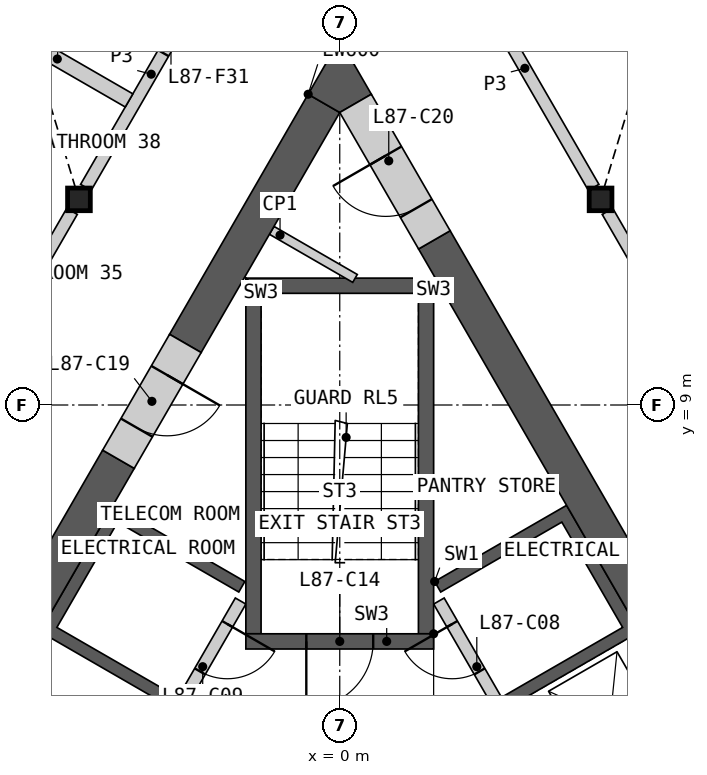
"""IFC4 building model, lengths in metres.
Left out: names, types, materials, properties, quantities, classifications, styles, units other than length and angle.
Written with IfcOpenShell. Run it as: python <this file> out.ifc"""

import sys

from ifc_helpers import new_model, si_unit, direction, frame, frame_2d, origin, origin_2d, place, context, subcontext, project, spatial, polyline, rectangle, i_section, outline, extrude, element, fill, save


model = new_model("IFC4")
c1 = context("Model", 3, precision=1e-05, world=origin(), true_north=direction((0.0, 1.0)))
c2 = subcontext(c1, "Body", "Model", "MODEL_VIEW")
j1 = project(units=[si_unit("LENGTHUNIT", "METRE"), si_unit("PLANEANGLEUNIT", "RADIAN")], contexts=[c1])
p1 = place(None, origin())
s1 = spatial("IfcSite", under=j1, at=p1, CompositionType="ELEMENT")
p2 = place(p1, origin())
s2 = spatial("IfcBuilding", under=s1, at=p2, CompositionType="ELEMENT")
p3 = place(p2, frame((0.0, 0.0, 384.8)))
s3 = spatial("IfcBuildingStorey", under=s2, at=p3, CompositionType="ELEMENT", Elevation=384.8)
for number, where, z_axis, x_axis in (
    (1, (-4.289, 12.382, 0.0), (0.0, 0.0, 1.0), (1.0, 0.0, 0.0)),
    (2, (4.289, 12.382, 0.0), (0.0, 0.0, 1.0), (1.0, 0.0, 0.0)),
):
    element("IfcColumn", number, at=place(p3, frame(where, z_axis=z_axis, x_axis=x_axis)), inside=s3, PredefinedType="COLUMN", context=c2, shape_type="SweptSolid", body=[
        extrude(i_section(OverallWidth=0.374, OverallDepth=0.372, WebThickness=0.016, FlangeThickness=0.026, at=origin_2d()), origin(), (0.0, 0.0, 1.0), 3.4),
    ])
p4 = place(p3, origin())
e3 = element("IfcWall", 3, at=p4, inside=s3, PredefinedType="SHEAR", context=c2, shape_type="SweptSolid", body=[
    extrude(outline(polyline([(1.561, 6.097), (3.731, 7.35), (8.231, -0.444), (6.061, -1.697), (5.96, -1.524), (7.952, -0.374), (6.952, 1.358), (4.96, 0.208), (4.861, 0.381), (6.852, 1.531), (5.852, 3.263), (3.861, 2.113), (3.76, 2.287), (5.752, 3.437), (4.752, 5.169), (2.76, 4.019), (2.66, 4.192), (4.652, 5.342), (3.652, 7.074), (1.66, 5.924), (1.561, 6.097)])), origin(), (0.0, 0.0, 1.0), 3.1),
])
p5 = place(p3, frame((5.817, -1.476, 0.0), z_axis=(0.0, 0.0, 1.0), x_axis=(-0.500002616675, 0.866023893041, 0.0)))
e4 = element("IfcWall", 4, at=p5, inside=s3, PredefinedType="SOLIDWALL", context=c2, shape_type="SweptSolid", body=[
    extrude(rectangle(XDim=8.373, YDim=0.2, at=frame_2d((4.187, 0.0))), origin(), (0.0, 0.0, 1.0), 3.1),
])
p6 = place(p5, frame((0.337, 0.0, 0.0)))
e5 = element("IfcOpeningElement", 5, at=p6, cuts=e4, PredefinedType="OPENING", context=c2, shape_type="SweptSolid", body=[
    extrude(rectangle(XDim=1.1, YDim=2.1, at=frame_2d((0.55, 1.05))), frame((0.0, 0.11, 0.0), z_axis=(0.0, -1.0, 0.0), x_axis=(1.0, 0.0, 0.0)), (0.0, 0.0, 1.0), 0.22),
])
p7 = place(p5, frame((2.537, 0.0, 0.0)))
e6 = element("IfcOpeningElement", 6, at=p7, cuts=e4, PredefinedType="OPENING", context=c2, shape_type="SweptSolid", body=[
    extrude(rectangle(XDim=1.1, YDim=2.1, at=frame_2d((0.55, 1.05))), frame((0.0, 0.11, 0.0), z_axis=(0.0, -1.0, 0.0), x_axis=(1.0, 0.0, 0.0)), (0.0, 0.0, 1.0), 0.22),
])
p8 = place(p5, frame((4.737, 0.0, 0.0)))
e7 = element("IfcOpeningElement", 7, at=p8, cuts=e4, PredefinedType="OPENING", context=c2, shape_type="SweptSolid", body=[
    extrude(rectangle(XDim=1.1, YDim=2.1, at=frame_2d((0.55, 1.05))), frame((0.0, 0.11, 0.0), z_axis=(0.0, -1.0, 0.0), x_axis=(1.0, 0.0, 0.0)), (0.0, 0.0, 1.0), 0.22),
])
p9 = place(p5, frame((7.037, 0.0, 0.0)))
e8 = element("IfcOpeningElement", 8, at=p9, cuts=e4, PredefinedType="OPENING", context=c2, shape_type="SweptSolid", body=[
    extrude(rectangle(XDim=0.9, YDim=2.1, at=frame_2d((0.45, 1.05))), frame((0.0, 0.11, 0.0), z_axis=(0.0, -1.0, 0.0), x_axis=(1.0, 0.0, 0.0)), (0.0, 0.0, 1.0), 0.22),
])
p10 = place(p3, origin())
e9 = element("IfcWall", 9, at=p10, inside=s3, PredefinedType="SHEAR", context=c2, shape_type="SweptSolid", body=[
    extrude(outline(polyline([(-4.96, 0.208), (-7.131, 1.461), (-3.731, 7.35), (-1.561, 6.097), (-1.66, 5.924), (-3.652, 7.074), (-4.652, 5.342), (-2.66, 4.192), (-2.76, 4.019), (-4.752, 5.169), (-6.852, 1.531), (-4.861, 0.381), (-4.96, 0.208)])), origin(), (0.0, 0.0, 1.0), 3.1),
])
p11 = place(p3, frame((-1.631, 5.776, 0.0), z_axis=(0.0, 0.0, 1.0), x_axis=(-0.499992876559, -0.866029516466, 0.0)))
e10 = element("IfcWall", 10, at=p11, inside=s3, PredefinedType="SOLIDWALL", context=c2, shape_type="SweptSolid", body=[
    extrude(rectangle(XDim=6.486, YDim=0.2, at=frame_2d((3.243, 0.0))), origin(), (0.0, 0.0, 1.0), 3.1),
])
p12 = place(p11, frame((0.437, 0.0, 0.0)))
e11 = element("IfcOpeningElement", 11, at=p12, cuts=e10, PredefinedType="OPENING", context=c2, shape_type="SweptSolid", body=[
    extrude(rectangle(XDim=0.9, YDim=2.1, at=frame_2d((0.45, 1.05))), frame((0.0, 0.11, 0.0), z_axis=(0.0, -1.0, 0.0), x_axis=(1.0, 0.0, 0.0)), (0.0, 0.0, 1.0), 0.22),
])
p13 = place(p11, frame((3.737, 0.0, 0.0)))
e12 = element("IfcOpeningElement", 12, at=p13, cuts=e10, PredefinedType="OPENING", context=c2, shape_type="SweptSolid", body=[
    extrude(rectangle(XDim=0.9, YDim=2.1, at=frame_2d((0.45, 1.05))), frame((0.0, 0.11, 0.0), z_axis=(0.0, -1.0, 0.0), x_axis=(1.0, 0.0, 0.0)), (0.0, 0.0, 1.0), 0.22),
])
p14 = place(p3, origin())
e13 = element("IfcWall", 13, at=p14, inside=s3, PredefinedType="SHEAR", context=c2, shape_type="SweptSolid", body=[
    extrude(outline(polyline([(1.544, 5.237), (1.544, 11.087), (1.294, 10.837), (1.294, 5.237), (1.544, 5.237)])), origin(), (0.0, 0.0, 1.0), 3.1),
])
p15 = place(p3, origin())
e14 = element("IfcWall", 14, at=p15, inside=s3, PredefinedType="SHEAR", context=c2, shape_type="SweptSolid", body=[
    extrude(outline(polyline([(1.544, 11.087), (-1.544, 11.087), (-1.294, 10.837), (1.294, 10.837), (1.544, 11.087)])), origin(), (0.0, 0.0, 1.0), 3.1),
])
p16 = place(p3, origin())
e15 = element("IfcWall", 15, at=p16, inside=s3, PredefinedType="SHEAR", context=c2, shape_type="SweptSolid", body=[
    extrude(outline(polyline([(-1.294, 10.837), (-1.544, 11.087), (-1.544, 5.237), (-1.294, 5.237), (-1.294, 10.837)])), origin(), (0.0, 0.0, 1.0), 3.1),
])
p17 = place(p3, frame((1.544, 5.112, 0.0), z_axis=(0.0, 0.0, 1.0), x_axis=(-1.0, 0.0, 0.0)))
e16 = element("IfcWall", 16, at=p17, inside=s3, PredefinedType="SHEAR", context=c2, shape_type="SweptSolid", body=[
    extrude(rectangle(XDim=3.088, YDim=0.25, at=frame_2d((1.544, 0.0))), origin(), (0.0, 0.0, 1.0), 3.1),
])
p18 = place(p17, frame((0.994, 0.0, 0.0)))
e17 = element("IfcOpeningElement", 17, at=p18, cuts=e16, PredefinedType="OPENING", context=c2, shape_type="SweptSolid", body=[
    extrude(rectangle(XDim=1.1, YDim=2.1, at=frame_2d((0.55, 1.05))), frame((0.0, 0.135, 0.0), z_axis=(0.0, -1.0, 0.0), x_axis=(1.0, 0.0, 0.0)), (0.0, 0.0, 1.0), 0.27),
])
p19 = place(p3, frame((-1.119, 11.873, 0.0), z_axis=(0.0, 0.0, 1.0), x_axis=(0.865992812752, -0.500056445075, 0.0)))
e18 = element("IfcWall", 18, at=p19, inside=s3, PredefinedType="PARTITIONING", context=c2, shape_type="SweptSolid", body=[
    extrude(rectangle(XDim=1.582, YDim=0.15, at=frame_2d((0.791, 0.0))), origin(), (0.0, 0.0, 1.0), 3.1),
])
p20 = place(p3, frame((8.841, -0.902, 0.0), z_axis=(0.0, 0.0, 1.0), x_axis=(-0.499995618375, 0.866027933502, 0.0)))
e19 = element("IfcWall", 19, at=p20, inside=s3, PredefinedType="SHEAR", context=c2, shape_type="SweptSolid", body=[
    extrude(rectangle(XDim=14.571, YDim=0.6, at=frame_2d((7.285, 0.0))), origin(), (0.0, 0.0, 1.0), 3.1),
])
p21 = place(p3, frame((-3.639, 8.107, 0.0), z_axis=(0.0, 0.0, 1.0), x_axis=(-0.49999180351, -0.866030135978, 0.0)))
e20 = element("IfcWall", 20, at=p21, inside=s3, PredefinedType="SHEAR", context=c2, shape_type="SweptSolid", body=[
    extrude(rectangle(XDim=7.401, YDim=0.6, at=frame_2d((3.701, 0.0))), origin(), (0.0, 0.0, 1.0), 3.1),
])
p22 = place(p3, frame((-0.26, 13.961, 0.0), z_axis=(0.0, 0.0, 1.0), x_axis=(-0.499980485389, -0.866036670257, 0.0)))
e21 = element("IfcWall", 21, at=p22, inside=s3, PredefinedType="SHEAR", context=c2, shape_type="SweptSolid", body=[
    extrude(rectangle(XDim=4.559, YDim=0.6, at=frame_2d((2.28, 0.0))), origin(), (0.0, 0.0, 1.0), 3.1),
])
p23 = place(p3, origin())
e22 = element("IfcWall", 22, at=p23, inside=s3, PredefinedType="SHEAR", context=c2, shape_type="SweptSolid", body=[
    extrude(outline(polyline([(-0.52, 14.111), (0.0, 15.011), (0.52, 14.111), (0.0, 13.811), (-0.52, 14.111)])), origin(), (0.0, 0.0, 1.0), 3.1),
])
p24 = place(p3, frame((-2.539, 10.013, 0.0), z_axis=(0.0, 0.0, 1.0), x_axis=(-0.50002983664, -0.866008176907, 0.0)))
e23 = element("IfcWall", 23, at=p24, inside=s3, PredefinedType="SHEAR", context=c2, shape_type="SweptSolid", body=[
    extrude(rectangle(XDim=2.2, YDim=0.6, at=frame_2d((1.1, 0.0))), origin(), (0.0, 0.0, 1.0), 3.1),
])
p25 = place(p24, frame((0.6, 0.0, 0.0)))
e24 = element("IfcOpeningElement", 24, at=p25, cuts=e23, PredefinedType="OPENING", context=c2, shape_type="SweptSolid", body=[
    extrude(rectangle(XDim=1.0, YDim=2.1, at=frame_2d((0.5, 1.05))), frame((0.0, 0.31, 0.0), z_axis=(0.0, -1.0, 0.0), x_axis=(1.0, 0.0, 0.0)), (0.0, 0.0, 1.0), 0.62),
])
p26 = place(p3, frame((1.556, 11.716, 0.0), z_axis=(0.0, 0.0, 1.0), x_axis=(-0.500018667571, 0.866014625789, 0.0)))
e25 = element("IfcWall", 25, at=p26, inside=s3, PredefinedType="SHEAR", context=c2, shape_type="SweptSolid", body=[
    extrude(rectangle(XDim=2.592, YDim=0.6, at=frame_2d((1.296, 0.0))), origin(), (0.0, 0.0, 1.0), 3.1),
])
p27 = place(p26, frame((0.6, 0.0, 0.0)))
e26 = element("IfcOpeningElement", 26, at=p27, cuts=e25, PredefinedType="OPENING", context=c2, shape_type="SweptSolid", body=[
    extrude(rectangle(XDim=1.0, YDim=2.1, at=frame_2d((0.5, 1.05))), frame((0.0, 0.31, 0.0), z_axis=(0.0, -1.0, 0.0), x_axis=(1.0, 0.0, 0.0)), (0.0, 0.0, 1.0), 0.62),
])
p28 = place(p3, frame((4.403, 12.185, 0.0), z_axis=(0.0, 0.0, 1.0), x_axis=(0.499992155518, -0.866029932751, 0.0)))
e27 = element("IfcWall", 27, at=p28, inside=s3, PredefinedType="PARTITIONING", context=c2, shape_type="SweptSolid", body=[
    extrude(rectangle(XDim=8.123, YDim=0.2, at=frame_2d((4.062, 0.0))), origin(), (0.0, 0.0, 1.0), 3.1),
])
p29 = place(p28, frame((3.587, 0.0, 0.0)))
e28 = element("IfcOpeningElement", 28, at=p29, cuts=e27, PredefinedType="OPENING", context=c2, shape_type="SweptSolid", body=[
    extrude(rectangle(XDim=0.95, YDim=2.1, at=frame_2d((0.475, 1.05))), frame((0.0, 0.11, 0.0), z_axis=(0.0, -1.0, 0.0), x_axis=(1.0, 0.0, 0.0)), (0.0, 0.0, 1.0), 0.22),
])
p30 = place(p3, frame((-8.465, 5.15, 0.0), z_axis=(0.0, 0.0, 1.0), x_axis=(0.499992155518, 0.866029932751, 0.0)))
e29 = element("IfcWall", 29, at=p30, inside=s3, PredefinedType="PARTITIONING", context=c2, shape_type="SweptSolid", body=[
    extrude(rectangle(XDim=8.123, YDim=0.2, at=frame_2d((4.062, 0.0))), origin(), (0.0, 0.0, 1.0), 3.1),
])
p31 = place(p30, frame((1.153, 0.0, 0.0)))
e30 = element("IfcOpeningElement", 30, at=p31, cuts=e29, PredefinedType="OPENING", context=c2, shape_type="SweptSolid", body=[
    extrude(rectangle(XDim=1.0, YDim=2.1, at=frame_2d((0.5, 1.05))), frame((0.0, 0.11, 0.0), z_axis=(0.0, -1.0, 0.0), x_axis=(1.0, 0.0, 0.0)), (0.0, 0.0, 1.0), 0.22),
])
p32 = place(p3, frame((1.913, 16.498, 0.0), z_axis=(0.0, 0.0, 1.0), x_axis=(0.499974648164, -0.866040040179, 0.0)))
e31 = element("IfcWall", 31, at=p32, inside=s3, PredefinedType="PARTITIONING", context=c2, shape_type="SweptSolid", body=[
    extrude(rectangle(XDim=4.525, YDim=0.2, at=frame_2d((2.263, 0.0))), origin(), (0.0, 0.0, 1.0), 3.1),
])
p33 = place(p3, frame((-4.176, 12.579, 0.0), z_axis=(0.0, 0.0, 1.0), x_axis=(0.500004215162, 0.866022970146, 0.0)))
e32 = element("IfcWall", 32, at=p33, inside=s3, PredefinedType="PARTITIONING", context=c2, shape_type="SweptSolid", body=[
    extrude(rectangle(XDim=4.3, YDim=0.2, at=frame_2d((2.15, 0.0))), origin(), (0.0, 0.0, 1.0), 3.1),
])
p34 = place(p33, frame((2.55, 0.0, 0.0)))
e33 = element("IfcOpeningElement", 33, at=p34, cuts=e32, PredefinedType="OPENING", context=c2, shape_type="SweptSolid", body=[
    extrude(rectangle(XDim=1.0, YDim=2.1, at=frame_2d((0.5, 1.05))), frame((0.0, 0.11, 0.0), z_axis=(0.0, -1.0, 0.0), x_axis=(1.0, 0.0, 0.0)), (0.0, 0.0, 1.0), 0.22),
])
p35 = place(p3, frame((-5.825, 15.372, 0.0), z_axis=(0.0, 0.0, 1.0), x_axis=(0.866051307416, -0.49995513091, 0.0)))
e34 = element("IfcWall", 34, at=p35, inside=s3, PredefinedType="PARTITIONING", context=c2, shape_type="SweptSolid", body=[
    extrude(rectangle(XDim=2.725, YDim=0.25, at=frame_2d((1.362, 0.0))), origin(), (0.0, 0.0, 1.0), 2.33),
])
p36 = place(p3, frame((3.926, 19.811, 0.0), z_axis=(0.0, 0.0, 1.0), x_axis=(0.500001082559, -0.866024778768, 0.0)))
e35 = element("IfcWall", 35, at=p36, inside=s3, PredefinedType="PARTITIONING", context=c2, shape_type="SweptSolid", body=[
    extrude(rectangle(XDim=15.094, YDim=0.2, at=frame_2d((7.547, 0.0))), origin(), (0.0, 0.0, 1.0), 2.33),
])
p37 = place(p36, frame((3.761, 0.0, 0.0)))
e36 = element("IfcOpeningElement", 36, at=p37, cuts=e35, PredefinedType="OPENING", context=c2, shape_type="SweptSolid", body=[
    extrude(rectangle(XDim=0.95, YDim=2.1, at=frame_2d((0.475, 1.05))), frame((0.0, 0.11, 0.0), z_axis=(0.0, -1.0, 0.0), x_axis=(1.0, 0.0, 0.0)), (0.0, 0.0, 1.0), 0.22),
])
p38 = place(p9, origin())
e37 = element("IfcDoor", 37, at=p38, inside=s3, OperationType="SINGLE_SWING_RIGHT", PredefinedType="DOOR", context=c2, shape_type="SweptSolid", body=[
    extrude(rectangle(XDim=0.9, YDim=2.1, at=frame_2d((0.45, 1.05))), frame((0.0, 0.025, 0.0), z_axis=(0.0, -1.0, 0.0), x_axis=(1.0, 0.0, 0.0)), (0.0, 0.0, 1.0), 0.05),
])
fill(e8, e37)
p39 = place(p12, origin())
e38 = element("IfcDoor", 38, at=p39, inside=s3, OperationType="SINGLE_SWING_LEFT", PredefinedType="DOOR", context=c2, shape_type="SweptSolid", body=[
    extrude(rectangle(XDim=0.9, YDim=2.1, at=frame_2d((0.45, 1.05))), frame((0.0, 0.025, 0.0), z_axis=(0.0, -1.0, 0.0), x_axis=(1.0, 0.0, 0.0)), (0.0, 0.0, 1.0), 0.05),
])
fill(e11, e38)
p40 = place(p18, origin())
e39 = element("IfcDoor", 39, at=p40, inside=s3, OperationType="SINGLE_SWING_RIGHT", PredefinedType="DOOR", context=c2, shape_type="SweptSolid", body=[
    extrude(rectangle(XDim=1.1, YDim=2.1, at=frame_2d((0.55, 1.05))), frame((0.0, 0.025, 0.0), z_axis=(0.0, -1.0, 0.0), x_axis=(1.0, 0.0, 0.0)), (0.0, 0.0, 1.0), 0.05),
])
fill(e17, e39)
p41 = place(p25, origin())
e40 = element("IfcDoor", 40, at=p41, inside=s3, OperationType="SINGLE_SWING_LEFT", PredefinedType="DOOR", context=c2, shape_type="SweptSolid", body=[
    extrude(rectangle(XDim=1.0, YDim=2.1, at=frame_2d((0.5, 1.05))), frame((0.0, 0.055, 0.0), z_axis=(0.0, -1.0, 0.0), x_axis=(1.0, 0.0, 0.0)), (0.0, 0.0, 1.0), 0.05),
])
fill(e24, e40)
p42 = place(p27, origin())
e41 = element("IfcDoor", 41, at=p42, inside=s3, OperationType="SINGLE_SWING_RIGHT", PredefinedType="DOOR", context=c2, shape_type="SweptSolid", body=[
    extrude(rectangle(XDim=1.0, YDim=2.1, at=frame_2d((0.5, 1.05))), frame((0.0, 0.055, 0.0), z_axis=(0.0, -1.0, 0.0), x_axis=(1.0, 0.0, 0.0)), (0.0, 0.0, 1.0), 0.05),
])
fill(e26, e41)
p43 = place(p34, origin())
e42 = element("IfcDoor", 42, at=p43, inside=s3, OperationType="SINGLE_SWING_RIGHT", PredefinedType="DOOR", context=c2, shape_type="SweptSolid", body=[
    extrude(rectangle(XDim=1.0, YDim=2.1, at=frame_2d((0.5, 1.05))), frame((0.0, 0.025, 0.0), z_axis=(0.0, -1.0, 0.0), x_axis=(1.0, 0.0, 0.0)), (0.0, 0.0, 1.0), 0.05),
])
fill(e33, e42)
save(model, sys.argv[1])
